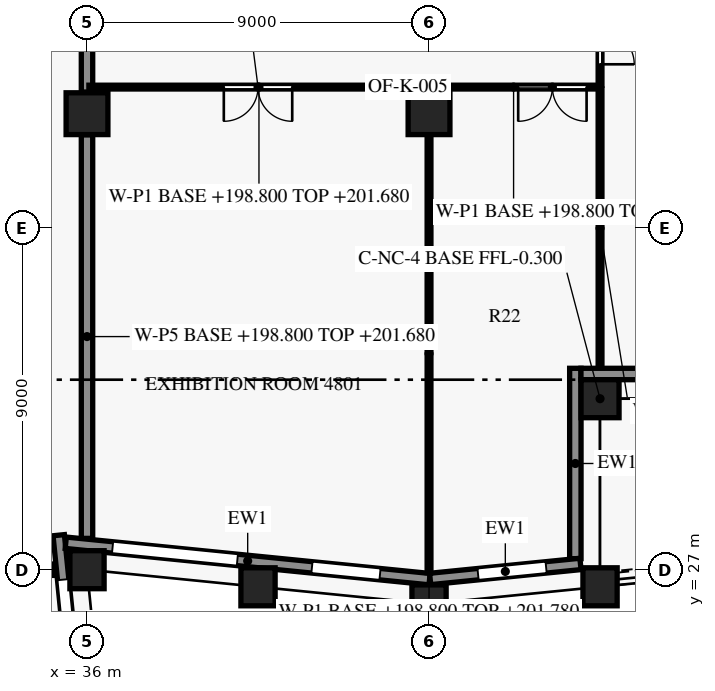
"""IFC4 building model, lengths in metres.
Left out: names, types, materials, properties, quantities, classifications, styles, units other than length and angle.
Written with IfcOpenShell. Run it as: python <this file> out.ifc"""

import sys

from ifc_helpers import new_model, si_unit, direction, frame, frame_2d, origin, origin_2d, place, context, subcontext, project, spatial, rectangle, extrude, element, fill, save


model = new_model("IFC4")
c1 = context("Model", 3, precision=1e-05, world=origin(), true_north=direction((0.0, 1.0)))
c2 = subcontext(c1, "Body", "Model", "MODEL_VIEW")
j1 = project(units=[si_unit("LENGTHUNIT", "METRE"), si_unit("PLANEANGLEUNIT", "RADIAN")], contexts=[c1])
p1 = place(None, origin())
s1 = spatial("IfcSite", under=j1, at=p1, CompositionType="ELEMENT")
p2 = place(p1, origin())
s2 = spatial("IfcBuilding", under=s1, at=p2, CompositionType="ELEMENT")
p3 = place(p2, frame((0.0, 0.0, 198.8)))
s3 = spatial("IfcBuildingStorey", under=s2, at=p3, CompositionType="ELEMENT", Elevation=198.8)
for number, where, z_axis, x_axis in (
    (1, (36.0, 27.0, 0.0), (0.0, 0.0, 1.0), (-0.1, 0.995, 0.0)),
    (2, (40.5, 26.55, 0.0), (0.0, 0.0, 1.0), (0.995, -0.1, 0.0)),
    (3, (45.0, 26.1, 0.0), (0.0, 0.0, 1.0), (1.0, 0.0, 0.0)),
    (4, (49.5, 26.55, 0.0), (0.0, 0.0, 1.0), (0.995, 0.1, 0.0)),
):
    element("IfcColumn", number, at=place(p3, frame(where, z_axis=z_axis, x_axis=x_axis)), inside=s3, PredefinedType="COLUMN", context=c2, shape_type="SweptSolid", body=[
        extrude(rectangle(XDim=0.9, YDim=1.0, at=origin_2d()), origin(), (0.0, 0.0, 1.0), 3.8),
    ])
p4 = place(p3, frame((49.5, 31.5, -0.3), z_axis=(0.0, 0.0, 1.0), x_axis=(1.0, 0.0, 0.0)))
e5 = element("IfcColumn", 5, at=p4, inside=s3, PredefinedType="COLUMN", context=c2, shape_type="SweptSolid", body=[
    extrude(rectangle(XDim=1.0, YDim=1.0, at=origin_2d()), origin(), (0.0, 0.0, 1.0), 4.1),
])
for number, where, z_axis, x_axis in (
    (6, (36.0, 39.0, 0.0), (0.0, 0.0, 1.0), (1.0, 0.0, 0.0)),
    (7, (45.0, 39.0, 0.0), (0.0, 0.0, 1.0), (1.0, 0.0, 0.0)),
):
    element("IfcColumn", number, at=place(p3, frame(where, z_axis=z_axis, x_axis=x_axis)), inside=s3, PredefinedType="COLUMN", context=c2, shape_type="SweptSolid", body=[
        extrude(rectangle(XDim=1.1, YDim=1.1, at=origin_2d()), origin(), (0.0, 0.0, 1.0), 3.8),
    ])
p5 = place(p3, frame((35.256, 27.908, 0.0), z_axis=(0.0, 0.0, 1.0), x_axis=(0.099535070904, -0.995034054523, 0.0)))
e8 = element("IfcWall", 8, at=p5, inside=s3, PredefinedType="SOLIDWALL", context=c2, shape_type="SweptSolid", body=[
    extrude(rectangle(XDim=4.626, YDim=0.3, at=frame_2d((2.313, 0.0))), origin(), (0.0, 0.0, 1.0), 3.15),
])
p6 = place(p5, frame((1.176, 0.0, 0.15)))
e9 = element("IfcOpeningElement", 9, at=p6, cuts=e8, PredefinedType="OPENING", context=c2, shape_type="SweptSolid", body=[
    extrude(rectangle(XDim=3.3, YDim=2.4, at=frame_2d((1.65, 1.2))), frame((0.0, 0.16, 0.0), z_axis=(0.0, -1.0, 0.0), x_axis=(1.0, 0.0, 0.0)), (0.0, 0.0, 1.0), 0.32),
])
p7 = place(p3, frame((45.015, 26.752, 0.0), z_axis=(0.0, 0.0, 1.0), x_axis=(-0.9950379439, 0.099496181828, 0.0)))
e10 = element("IfcWall", 10, at=p7, inside=s3, PredefinedType="SOLIDWALL", context=c2, shape_type="SweptSolid", body=[
    extrude(rectangle(XDim=9.621, YDim=0.3, at=frame_2d((4.811, 0.0))), origin(), (0.0, 0.0, 1.0), 3.15),
])
p8 = place(p7, frame((1.311, 0.0, 0.75)))
e11 = element("IfcOpeningElement", 11, at=p8, cuts=e10, PredefinedType="OPENING", context=c2, shape_type="SweptSolid", body=[
    extrude(rectangle(XDim=1.8, YDim=1.8, at=frame_2d((0.9, 0.9))), frame((0.0, 0.16, 0.0), z_axis=(0.0, -1.0, 0.0), x_axis=(1.0, 0.0, 0.0)), (0.0, 0.0, 1.0), 0.32),
])
p9 = place(p7, frame((5.083, 0.0, 0.15)))
e12 = element("IfcOpeningElement", 12, at=p9, cuts=e10, PredefinedType="OPENING", context=c2, shape_type="SweptSolid", body=[
    extrude(rectangle(XDim=3.3, YDim=2.4, at=frame_2d((1.65, 1.2))), frame((0.0, 0.16, 0.0), z_axis=(0.0, -1.0, 0.0), x_axis=(1.0, 0.0, 0.0)), (0.0, 0.0, 1.0), 0.32),
])
p10 = place(p3, frame((48.985, 27.152, 0.0), z_axis=(0.0, 0.0, 1.0), x_axis=(-0.995037798293, -0.099497638, 0.0)))
e13 = element("IfcWall", 13, at=p10, inside=s3, PredefinedType="SOLIDWALL", context=c2, shape_type="SweptSolid", body=[
    extrude(rectangle(XDim=3.975, YDim=0.3, at=frame_2d((1.988, 0.0))), origin(), (0.0, 0.0, 1.0), 3.15),
])
p11 = place(p10, frame((0.909, 0.0, 0.75)))
e14 = element("IfcOpeningElement", 14, at=p11, cuts=e13, PredefinedType="OPENING", context=c2, shape_type="SweptSolid", body=[
    extrude(rectangle(XDim=1.8, YDim=1.8, at=frame_2d((0.9, 0.9))), frame((0.0, 0.16, 0.0), z_axis=(0.0, -1.0, 0.0), x_axis=(1.0, 0.0, 0.0)), (0.0, 0.0, 1.0), 0.32),
])
p12 = place(p3, frame((48.85, 32.3, 0.0), z_axis=(0.0, 0.0, 1.0), x_axis=(0.0, -1.0, 0.0)))
e15 = element("IfcWall", 15, at=p12, inside=s3, PredefinedType="SOLIDWALL", context=c2, shape_type="SweptSolid", body=[
    extrude(rectangle(XDim=5.01, YDim=0.3, at=frame_2d((2.505, 0.0))), origin(), (0.0, 0.0, 1.0), 3.15),
])
p13 = place(p3, frame((53.55, 32.15, 0.0), z_axis=(0.0, 0.0, 1.0), x_axis=(-1.0, 0.0, 0.0)))
e16 = element("IfcWall", 16, at=p13, inside=s3, PredefinedType="SOLIDWALL", context=c2, shape_type="SweptSolid", body=[
    extrude(rectangle(XDim=4.552, YDim=0.3, at=frame_2d((2.276, 0.0))), origin(), (0.0, 0.0, 1.0), 3.15),
])
p14 = place(p3, frame((24.555, 27.0, 0.0), z_axis=(0.0, 0.0, 1.0), x_axis=(1.0, 0.0, 0.0)))
e17 = element("IfcWall", 17, at=p14, inside=s3, PredefinedType="PARTITIONING", context=c2, shape_type="SweptSolid", body=[
    extrude(rectangle(XDim=10.591, YDim=0.3, at=frame_2d((5.295, 0.0))), origin(), (0.0, 0.0, 1.0), 2.88),
])
p15 = place(p3, frame((36.0, 27.824, 0.0), z_axis=(0.0, 0.0, 1.0), x_axis=(0.0, 1.0, 0.0)))
e18 = element("IfcWall", 18, at=p15, inside=s3, PredefinedType="PARTITIONING", context=c2, shape_type="SweptSolid", body=[
    extrude(rectangle(XDim=10.621, YDim=0.3, at=frame_2d((5.311, 0.0))), origin(), (0.0, 0.0, 1.0), 2.88),
])
p16 = place(p3, frame((49.5, 32.32, 0.0), z_axis=(0.0, 0.0, 1.0), x_axis=(0.0, 1.0, 0.0)))
e19 = element("IfcWall", 19, at=p16, inside=s3, PredefinedType="PARTITIONING", context=c2, shape_type="SweptSolid", body=[
    extrude(rectangle(XDim=7.33, YDim=0.1, at=frame_2d((3.665, 0.0))), origin(), (0.0, 0.0, 1.0), 2.88),
])
p17 = place(p3, frame((45.0, 38.445, 0.0), z_axis=(0.0, 0.0, 1.0), x_axis=(0.0, -1.0, 0.0)))
e20 = element("IfcWall", 20, at=p17, inside=s3, PredefinedType="PARTITIONING", context=c2, shape_type="SweptSolid", body=[
    extrude(rectangle(XDim=11.521, YDim=0.1, at=frame_2d((5.76, 0.0))), origin(), (0.0, 0.0, 1.0), 2.98),
])
p18 = place(p3, frame((45.0, 39.7, 0.0), z_axis=(0.0, 0.0, 1.0), x_axis=(-1.0, 0.0, 0.0)))
e21 = element("IfcWall", 21, at=p18, inside=s3, PredefinedType="PARTITIONING", context=c2, shape_type="SweptSolid", body=[
    extrude(rectangle(XDim=8.95, YDim=0.1, at=frame_2d((4.475, 0.0))), origin(), (0.0, 0.0, 1.0), 2.88),
])
p19 = place(p18, frame((3.6, 0.0, 0.0)))
e22 = element("IfcOpeningElement", 22, at=p19, cuts=e21, PredefinedType="OPENING", context=c2, shape_type="SweptSolid", body=[
    extrude(rectangle(XDim=1.8, YDim=2.1, at=frame_2d((0.9, 1.05))), frame((0.0, 0.06, 0.0), z_axis=(0.0, -1.0, 0.0), x_axis=(1.0, 0.0, 0.0)), (0.0, 0.0, 1.0), 0.12),
])
p20 = place(p3, frame((49.45, 39.7, 0.0), z_axis=(0.0, 0.0, 1.0), x_axis=(-1.0, 0.0, 0.0)))
e23 = element("IfcWall", 23, at=p20, inside=s3, PredefinedType="PARTITIONING", context=c2, shape_type="SweptSolid", body=[
    extrude(rectangle(XDim=4.45, YDim=0.1, at=frame_2d((2.225, 0.0))), origin(), (0.0, 0.0, 1.0), 2.98),
])
p21 = place(p20, frame((0.304, 0.0, 0.0)))
e24 = element("IfcOpeningElement", 24, at=p21, cuts=e23, PredefinedType="OPENING", context=c2, shape_type="SweptSolid", body=[
    extrude(rectangle(XDim=1.8, YDim=2.1, at=frame_2d((0.9, 1.05))), frame((0.0, 0.06, 0.0), z_axis=(0.0, -1.0, 0.0), x_axis=(1.0, 0.0, 0.0)), (0.0, 0.0, 1.0), 0.12),
])
p22 = place(p3, frame((36.0, 39.57, 0.0), z_axis=(0.0, 0.0, 1.0), x_axis=(0.0, 1.0, 0.0)))
e25 = element("IfcWall", 25, at=p22, inside=s3, PredefinedType="PARTITIONING", context=c2, shape_type="SweptSolid", body=[
    extrude(rectangle(XDim=8.38, YDim=0.3, at=frame_2d((4.19, 0.0))), origin(), (0.0, 0.0, 1.0), 2.88),
])
p23 = place(p3, frame((49.5, 42.9, 0.0), z_axis=(0.0, 0.0, 1.0), x_axis=(0.0, -1.0, 0.0)))
e26 = element("IfcWall", 26, at=p23, inside=s3, PredefinedType="PARTITIONING", context=c2, shape_type="SweptSolid", body=[
    extrude(rectangle(XDim=3.15, YDim=0.1, at=frame_2d((1.575, 0.0))), origin(), (0.0, 0.0, 1.0), 2.88),
])
p24 = place(p23, frame((0.8, 0.0, 0.0)))
e27 = element("IfcOpeningElement", 27, at=p24, cuts=e26, PredefinedType="OPENING", context=c2, shape_type="SweptSolid", body=[
    extrude(rectangle(XDim=1.8, YDim=2.1, at=frame_2d((0.9, 1.05))), frame((0.0, 0.06, 0.0), z_axis=(0.0, -1.0, 0.0), x_axis=(1.0, 0.0, 0.0)), (0.0, 0.0, 1.0), 0.12),
])
p25 = place(p6, origin())
e28 = element("IfcWindow", 28, at=p25, inside=s3, PartitioningType="SINGLE_PANEL", PredefinedType="WINDOW", context=c2, shape_type="SweptSolid", body=[
    extrude(rectangle(XDim=3.3, YDim=2.4, at=frame_2d((1.65, 1.2))), frame((0.0, 0.03, 0.0), z_axis=(0.0, -1.0, 0.0), x_axis=(1.0, 0.0, 0.0)), (0.0, 0.0, 1.0), 0.06),
])
fill(e9, e28)
p26 = place(p8, origin())
e29 = element("IfcWindow", 29, at=p26, inside=s3, PartitioningType="SINGLE_PANEL", PredefinedType="WINDOW", context=c2, shape_type="SweptSolid", body=[
    extrude(rectangle(XDim=1.8, YDim=1.8, at=frame_2d((0.9, 0.9))), frame((0.0, 0.03, 0.0), z_axis=(0.0, -1.0, 0.0), x_axis=(1.0, 0.0, 0.0)), (0.0, 0.0, 1.0), 0.06),
])
fill(e11, e29)
p27 = place(p9, origin())
e30 = element("IfcWindow", 30, at=p27, inside=s3, PartitioningType="SINGLE_PANEL", PredefinedType="WINDOW", context=c2, shape_type="SweptSolid", body=[
    extrude(rectangle(XDim=3.3, YDim=2.4, at=frame_2d((1.65, 1.2))), frame((0.0, 0.03, 0.0), z_axis=(0.0, -1.0, 0.0), x_axis=(1.0, 0.0, 0.0)), (0.0, 0.0, 1.0), 0.06),
])
fill(e12, e30)
p28 = place(p11, origin())
e31 = element("IfcWindow", 31, at=p28, inside=s3, PartitioningType="SINGLE_PANEL", PredefinedType="WINDOW", context=c2, shape_type="SweptSolid", body=[
    extrude(rectangle(XDim=1.8, YDim=1.8, at=frame_2d((0.9, 0.9))), frame((0.0, 0.03, 0.0), z_axis=(0.0, -1.0, 0.0), x_axis=(1.0, 0.0, 0.0)), (0.0, 0.0, 1.0), 0.06),
])
fill(e14, e31)
p29 = place(p24, origin())
e32 = element("IfcDoor", 32, at=p29, inside=s3, OperationType="DOUBLE_DOOR_SINGLE_SWING", PredefinedType="DOOR", context=c2, shape_type="SweptSolid", body=[
    extrude(rectangle(XDim=1.8, YDim=2.1, at=frame_2d((0.9, 1.05))), frame((0.0, 0.025, 0.0), z_axis=(0.0, -1.0, 0.0), x_axis=(1.0, 0.0, 0.0)), (0.0, 0.0, 1.0), 0.05),
])
fill(e27, e32)
p30 = place(p19, origin())
e33 = element("IfcDoor", 33, at=p30, inside=s3, OperationType="DOUBLE_DOOR_SINGLE_SWING", PredefinedType="DOOR", context=c2, shape_type="SweptSolid", body=[
    extrude(rectangle(XDim=1.8, YDim=2.1, at=frame_2d((0.9, 1.05))), frame((0.0, 0.025, 0.0), z_axis=(0.0, -1.0, 0.0), x_axis=(1.0, 0.0, 0.0)), (0.0, 0.0, 1.0), 0.05),
])
fill(e22, e33)
p31 = place(p21, origin())
e34 = element("IfcDoor", 34, at=p31, inside=s3, OperationType="DOUBLE_DOOR_SINGLE_SWING", PredefinedType="DOOR", context=c2, shape_type="SweptSolid", body=[
    extrude(rectangle(XDim=1.8, YDim=2.1, at=frame_2d((0.9, 1.05))), frame((0.0, 0.025, 0.0), z_axis=(0.0, -1.0, 0.0), x_axis=(1.0, 0.0, 0.0)), (0.0, 0.0, 1.0), 0.05),
])
fill(e24, e34)
save(model, sys.argv[1])
